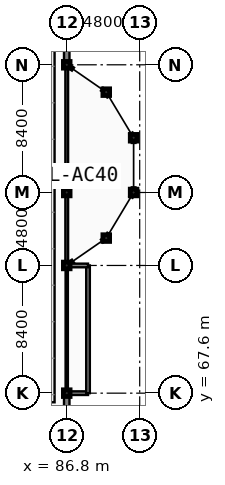
"""IFC4 building model, lengths in metres.
Left out: names, types, materials, properties, quantities, classifications, styles, units other than length and angle.
Written with IfcOpenShell. Run it as: python <this file> out.ifc"""

import sys

from ifc_helpers import new_model, si_unit, direction, frame, frame_2d, origin, origin_2d, place, context, subcontext, project, spatial, rectangle, extrude, element, fill, save


model = new_model("IFC4")
c1 = context("Model", 3, precision=1e-05, world=origin(), true_north=direction((0.0, 1.0)))
c2 = subcontext(c1, "Body", "Model", "MODEL_VIEW")
j1 = project(units=[si_unit("LENGTHUNIT", "METRE"), si_unit("PLANEANGLEUNIT", "RADIAN")], contexts=[c1])
p1 = place(None, origin())
s1 = spatial("IfcSite", under=j1, at=p1, CompositionType="ELEMENT")
p2 = place(p1, origin())
s2 = spatial("IfcBuilding", under=s1, at=p2, CompositionType="ELEMENT")
p3 = place(p2, frame((0.0, 0.0, 5.4)))
s3 = spatial("IfcBuildingStorey", under=s2, at=p3, CompositionType="ELEMENT", Elevation=5.4)
for number, where, z_axis, x_axis in (
    (1, (86.8, 67.6, 0.0), (0.0, 0.0, 1.0), (1.0, 0.0, 0.0)),
    (2, (86.8, 76.0, 0.0), (0.0, 0.0, 1.0), (1.0, 0.0, 0.0)),
    (3, (86.8, 80.8, 0.0), (0.0, 0.0, 1.0), (1.0, 0.0, 0.0)),
    (4, (86.8, 89.2, 0.0), (0.0, 0.0, 1.0), (1.0, 0.0, 0.0)),
    (5, (89.4, 77.8, 0.0), (0.0, 0.0, 1.0), (1.0, 0.0, 0.0)),
    (6, (89.4, 87.4, 0.0), (0.0, 0.0, 1.0), (1.0, 0.0, 0.0)),
    (7, (91.2, 80.8, 0.0), (0.0, 0.0, 1.0), (1.0, 0.0, 0.0)),
    (8, (91.2, 84.4, 0.0), (0.0, 0.0, 1.0), (1.0, 0.0, 0.0)),
):
    element("IfcColumn", number, at=place(p3, frame(where, z_axis=z_axis, x_axis=x_axis)), inside=s3, PredefinedType="COLUMN", context=c2, shape_type="SweptSolid", body=[
        extrude(rectangle(XDim=0.44, YDim=0.44, at=origin_2d()), origin(), (0.0, 0.0, 1.0), 4.2),
    ])
p4 = place(p3, frame((86.8, 67.6, 0.0), z_axis=(0.0, 0.0, 1.0), x_axis=(0.0, 1.0, 0.0)))
e9 = element("IfcWall", 9, at=p4, inside=s3, PredefinedType="PARTITIONING", context=c2, shape_type="SweptSolid", body=[
    extrude(rectangle(XDim=8.4, YDim=0.15, at=frame_2d((4.2, 0.0))), origin(), (0.0, 0.0, 1.0), 3.25),
])
p5 = place(p4, frame((3.7, 0.0, -0.01)))
e10 = element("IfcOpeningElement", 10, at=p5, cuts=e9, PredefinedType="OPENING", context=c2, shape_type="SweptSolid", body=[
    extrude(rectangle(XDim=1.0, YDim=2.16, at=frame_2d((0.5, 1.08))), frame((0.0, 0.085, 0.0), z_axis=(0.0, -1.0, 0.0), x_axis=(1.0, 0.0, 0.0)), (0.0, 0.0, 1.0), 0.17),
])
p6 = place(p3, frame((86.8, 76.0, 0.0), z_axis=(0.0, 0.0, 1.0), x_axis=(0.0, 1.0, 0.0)))
e11 = element("IfcWall", 11, at=p6, inside=s3, PredefinedType="PARTITIONING", context=c2, shape_type="SweptSolid", body=[
    extrude(rectangle(XDim=13.2, YDim=0.18, at=frame_2d((6.6, 0.0))), origin(), (0.0, 0.0, 1.0), 3.25),
])
p7 = place(p6, frame((5.8, 0.0, -0.01)))
e12 = element("IfcOpeningElement", 12, at=p7, cuts=e11, PredefinedType="OPENING", context=c2, shape_type="SweptSolid", body=[
    extrude(rectangle(XDim=1.6, YDim=2.21, at=frame_2d((0.8, 1.105))), frame((0.0, 0.1, 0.0), z_axis=(0.0, -1.0, 0.0), x_axis=(1.0, 0.0, 0.0)), (0.0, 0.0, 1.0), 0.2),
])
p8 = place(p3, frame((86.8, 59.2, 0.0), z_axis=(0.0, 0.0, 1.0), x_axis=(0.0, 1.0, 0.0)))
e13 = element("IfcWall", 13, at=p8, inside=s3, PredefinedType="SOLIDWALL", context=c2, shape_type="SweptSolid", body=[
    extrude(rectangle(XDim=8.4, YDim=0.36, at=frame_2d((4.2, 0.0))), origin(), (0.0, 0.0, 1.0), 3.25),
])
p9 = place(p8, frame((0.46, 0.0, 0.75)))
e14 = element("IfcOpeningElement", 14, at=p9, cuts=e13, PredefinedType="OPENING", context=c2, shape_type="SweptSolid", body=[
    extrude(rectangle(XDim=1.55, YDim=2.36, at=frame_2d((0.775, 1.18))), frame((0.0, 0.19, 0.0), z_axis=(0.0, -1.0, 0.0), x_axis=(1.0, 0.0, 0.0)), (0.0, 0.0, 1.0), 0.38),
])
p10 = place(p8, frame((6.26, 0.0, 0.75)))
e15 = element("IfcOpeningElement", 15, at=p10, cuts=e13, PredefinedType="OPENING", context=c2, shape_type="SweptSolid", body=[
    extrude(rectangle(XDim=1.55, YDim=2.36, at=frame_2d((0.775, 1.18))), frame((0.0, 0.19, 0.0), z_axis=(0.0, -1.0, 0.0), x_axis=(1.0, 0.0, 0.0)), (0.0, 0.0, 1.0), 0.38),
])
p11 = place(p3, frame((86.8, 89.2, 0.0), z_axis=(0.0, 0.0, 1.0), x_axis=(0.0, 1.0, 0.0)))
e16 = element("IfcWall", 16, at=p11, inside=s3, PredefinedType="SOLIDWALL", context=c2, shape_type="SweptSolid", body=[
    extrude(rectangle(XDim=8.4, YDim=0.36, at=frame_2d((4.2, 0.0))), origin(), (0.0, 0.0, 1.0), 3.25),
])
p12 = place(p11, frame((0.46, 0.0, 0.75)))
e17 = element("IfcOpeningElement", 17, at=p12, cuts=e16, PredefinedType="OPENING", context=c2, shape_type="SweptSolid", body=[
    extrude(rectangle(XDim=1.55, YDim=2.36, at=frame_2d((0.775, 1.18))), frame((0.0, 0.19, 0.0), z_axis=(0.0, -1.0, 0.0), x_axis=(1.0, 0.0, 0.0)), (0.0, 0.0, 1.0), 0.38),
])
p13 = place(p11, frame((6.26, 0.0, 0.75)))
e18 = element("IfcOpeningElement", 18, at=p13, cuts=e16, PredefinedType="OPENING", context=c2, shape_type="SweptSolid", body=[
    extrude(rectangle(XDim=1.55, YDim=2.36, at=frame_2d((0.775, 1.18))), frame((0.0, 0.19, 0.0), z_axis=(0.0, -1.0, 0.0), x_axis=(1.0, 0.0, 0.0)), (0.0, 0.0, 1.0), 0.38),
])
p14 = place(p3, frame((87.03, 76.159, 0.0), z_axis=(0.0, 0.0, 1.0), x_axis=(0.822192191644, 0.56920997883, 0.0)))
e19 = element("IfcWall", 19, at=p14, inside=s3, PredefinedType="SOLIDWALL", context=c2, shape_type="SweptSolid", body=[
    extrude(rectangle(XDim=0.22, YDim=0.24, at=frame_2d((0.11, 0.0))), origin(), (0.0, 0.0, 1.0), 3.25),
])
p15 = place(p3, frame((89.121, 77.606, 0.0), z_axis=(0.0, 0.0, 1.0), x_axis=(0.821855834467, 0.569695521619, 0.0)))
e20 = element("IfcWall", 20, at=p15, inside=s3, PredefinedType="SOLIDWALL", context=c2, shape_type="SweptSolid", body=[
    extrude(rectangle(XDim=0.34, YDim=0.24, at=frame_2d((0.17, 0.0))), origin(), (0.0, 0.0, 1.0), 3.25),
])
p16 = place(p3, frame((89.4, 77.8, 0.0), z_axis=(0.0, 0.0, 1.0), x_axis=(0.514812489021, 0.857302805984, 0.0)))
e21 = element("IfcWall", 21, at=p16, inside=s3, PredefinedType="SOLIDWALL", context=c2, shape_type="SweptSolid", body=[
    extrude(rectangle(XDim=0.34, YDim=0.24, at=frame_2d((0.17, 0.0))), origin(), (0.0, 0.0, 1.0), 3.25),
])
for number, where, z_axis, x_axis in (
    (22, (91.025, 80.509, 0.0), (0.0, 0.0, 1.0), (0.514, 0.858, 0.0)),
    (23, (91.2, 80.8, 0.0), (0.0, 0.0, 1.0), (0.0, 1.0, 0.0)),
    (24, (91.2, 84.06, 0.0), (0.0, 0.0, 1.0), (0.0, 1.0, 0.0)),
    (25, (91.2, 84.4, 0.0), (0.0, 0.0, 1.0), (-0.514, 0.858, 0.0)),
):
    element("IfcWall", number, at=place(p3, frame(where, z_axis=z_axis, x_axis=x_axis)), inside=s3, PredefinedType="SOLIDWALL", context=c2, shape_type="SweptSolid", body=[
        extrude(rectangle(XDim=0.34, YDim=0.24, at=frame_2d((0.17, 0.0))), origin(), (0.0, 0.0, 1.0), 3.25),
    ])
p17 = place(p3, frame((89.575, 87.108, 0.0), z_axis=(0.0, 0.0, 1.0), x_axis=(-0.514812489021, 0.857302805984, 0.0)))
e26 = element("IfcWall", 26, at=p17, inside=s3, PredefinedType="SOLIDWALL", context=c2, shape_type="SweptSolid", body=[
    extrude(rectangle(XDim=0.34, YDim=0.24, at=frame_2d((0.17, 0.0))), origin(), (0.0, 0.0, 1.0), 3.25),
])
p18 = place(p3, frame((89.4, 87.4, 0.0), z_axis=(0.0, 0.0, 1.0), x_axis=(-0.821855834467, 0.569695521619, 0.0)))
e27 = element("IfcWall", 27, at=p18, inside=s3, PredefinedType="SOLIDWALL", context=c2, shape_type="SweptSolid", body=[
    extrude(rectangle(XDim=0.34, YDim=0.24, at=frame_2d((0.17, 0.0))), origin(), (0.0, 0.0, 1.0), 3.25),
])
p19 = place(p3, frame((87.211, 88.915, 0.0), z_axis=(0.0, 0.0, 1.0), x_axis=(-0.822192191644, 0.56920997883, 0.0)))
e28 = element("IfcWall", 28, at=p19, inside=s3, PredefinedType="SOLIDWALL", context=c2, shape_type="SweptSolid", body=[
    extrude(rectangle(XDim=0.22, YDim=0.24, at=frame_2d((0.11, 0.0))), origin(), (0.0, 0.0, 1.0), 3.25),
])
p20 = place(p3, frame((86.8, 67.6, 0.0), z_axis=(0.0, 0.0, 1.0), x_axis=(1.0, 0.0, 0.0)))
e29 = element("IfcWall", 29, at=p20, inside=s3, PredefinedType="SOLIDWALL", context=c2, shape_type="SweptSolid", body=[
    extrude(rectangle(XDim=1.4, YDim=0.24, at=frame_2d((0.7, 0.0))), origin(), (0.0, 0.0, 1.0), 3.25),
])
p21 = place(p3, frame((88.2, 67.6, 0.0), z_axis=(0.0, 0.0, 1.0), x_axis=(0.0, 1.0, 0.0)))
e30 = element("IfcWall", 30, at=p21, inside=s3, PredefinedType="SOLIDWALL", context=c2, shape_type="SweptSolid", body=[
    extrude(rectangle(XDim=8.4, YDim=0.24, at=frame_2d((4.2, 0.0))), origin(), (0.0, 0.0, 1.0), 3.25),
])
p22 = place(p21, frame((0.46, 0.0, 0.65)))
e31 = element("IfcOpeningElement", 31, at=p22, cuts=e30, PredefinedType="OPENING", context=c2, shape_type="SweptSolid", body=[
    extrude(rectangle(XDim=2.4, YDim=2.25, at=frame_2d((1.2, 1.125))), frame((0.0, 0.13, 0.0), z_axis=(0.0, -1.0, 0.0), x_axis=(1.0, 0.0, 0.0)), (0.0, 0.0, 1.0), 0.26),
])
p23 = place(p21, frame((5.46, 0.0, 0.65)))
e32 = element("IfcOpeningElement", 32, at=p23, cuts=e30, PredefinedType="OPENING", context=c2, shape_type="SweptSolid", body=[
    extrude(rectangle(XDim=2.4, YDim=2.25, at=frame_2d((1.2, 1.125))), frame((0.0, 0.13, 0.0), z_axis=(0.0, -1.0, 0.0), x_axis=(1.0, 0.0, 0.0)), (0.0, 0.0, 1.0), 0.26),
])
p24 = place(p3, frame((88.2, 76.0, 0.0), z_axis=(0.0, 0.0, 1.0), x_axis=(-1.0, 0.0, 0.0)))
e33 = element("IfcWall", 33, at=p24, inside=s3, PredefinedType="SOLIDWALL", context=c2, shape_type="SweptSolid", body=[
    extrude(rectangle(XDim=1.4, YDim=0.24, at=frame_2d((0.7, 0.0))), origin(), (0.0, 0.0, 1.0), 3.25),
])
p25 = place(p5, frame((0.0, 0.0, 0.01)))
e34 = element("IfcDoor", 34, at=p25, inside=s3, OperationType="SINGLE_SWING_LEFT", PredefinedType="DOOR", context=c2, shape_type="SweptSolid", body=[
    extrude(rectangle(XDim=1.0, YDim=2.15, at=frame_2d((0.5, 1.075))), frame((0.0, 0.025, 0.0), z_axis=(0.0, -1.0, 0.0), x_axis=(1.0, 0.0, 0.0)), (0.0, 0.0, 1.0), 0.05),
])
fill(e10, e34)
p26 = place(p7, frame((1.6, 0.0, 0.01), z_axis=(0.0, 0.0, 1.0), x_axis=(-1.0, 0.0, 0.0)))
e35 = element("IfcDoor", 35, at=p26, inside=s3, OperationType="DOUBLE_SWING_LEFT", PredefinedType="DOOR", context=c2, shape_type="SweptSolid", body=[
    extrude(rectangle(XDim=1.6, YDim=2.2, at=frame_2d((0.8, 1.1))), frame((0.0, 0.025, 0.0), z_axis=(0.0, -1.0, 0.0), x_axis=(1.0, 0.0, 0.0)), (0.0, 0.0, 1.0), 0.05),
])
fill(e12, e35)
p27 = place(p10, origin())
e36 = element("IfcWindow", 36, at=p27, inside=s3, PartitioningType="DOUBLE_PANEL_HORIZONTAL", PredefinedType="WINDOW", context=c2, shape_type="SweptSolid", body=[
    extrude(rectangle(XDim=1.55, YDim=2.36, at=frame_2d((0.775, 1.18))), frame((0.0, 0.03, 0.0), z_axis=(0.0, -1.0, 0.0), x_axis=(1.0, 0.0, 0.0)), (0.0, 0.0, 1.0), 0.06),
])
fill(e15, e36)
p28 = place(p12, origin())
e37 = element("IfcWindow", 37, at=p28, inside=s3, PartitioningType="DOUBLE_PANEL_HORIZONTAL", PredefinedType="WINDOW", context=c2, shape_type="SweptSolid", body=[
    extrude(rectangle(XDim=1.55, YDim=2.36, at=frame_2d((0.775, 1.18))), frame((0.0, 0.03, 0.0), z_axis=(0.0, -1.0, 0.0), x_axis=(1.0, 0.0, 0.0)), (0.0, 0.0, 1.0), 0.06),
])
fill(e17, e37)
p29 = place(p22, origin())
e38 = element("IfcWindow", 38, at=p29, inside=s3, PartitioningType="TRIPLE_PANEL_VERTICAL", PredefinedType="WINDOW", context=c2, shape_type="SweptSolid", body=[
    extrude(rectangle(XDim=2.4, YDim=2.25, at=frame_2d((1.2, 1.125))), frame((0.0, 0.03, 0.0), z_axis=(0.0, -1.0, 0.0), x_axis=(1.0, 0.0, 0.0)), (0.0, 0.0, 1.0), 0.06),
])
fill(e31, e38)
p30 = place(p23, origin())
e39 = element("IfcWindow", 39, at=p30, inside=s3, PartitioningType="TRIPLE_PANEL_VERTICAL", PredefinedType="WINDOW", context=c2, shape_type="SweptSolid", body=[
    extrude(rectangle(XDim=2.4, YDim=2.25, at=frame_2d((1.2, 1.125))), frame((0.0, 0.03, 0.0), z_axis=(0.0, -1.0, 0.0), x_axis=(1.0, 0.0, 0.0)), (0.0, 0.0, 1.0), 0.06),
])
fill(e32, e39)
save(model, sys.argv[1])
